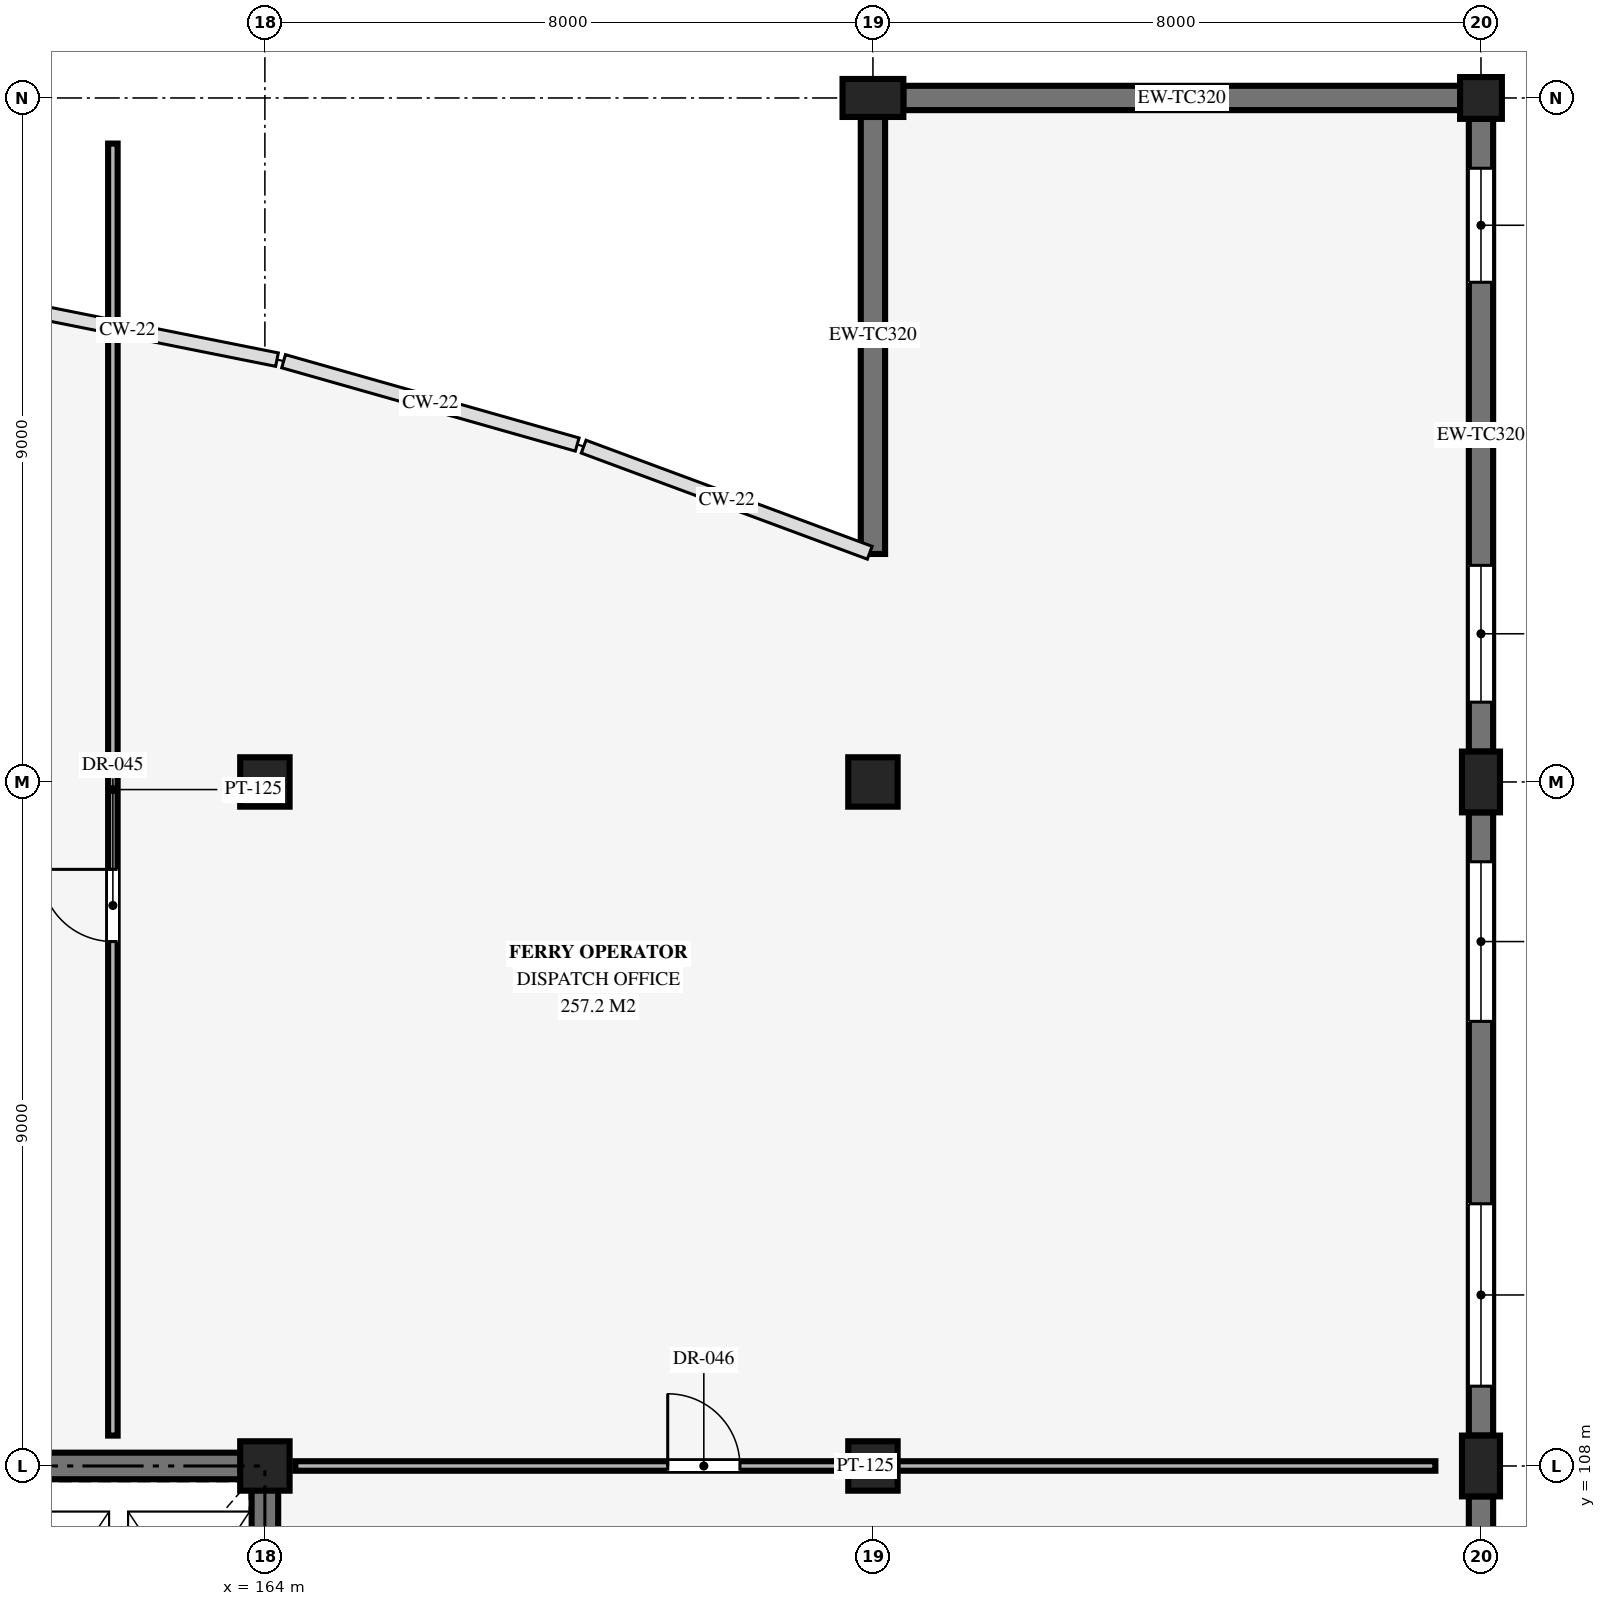
"""IFC4 building model, lengths in metres.
Left out: names, types, materials, properties, quantities, classifications, styles, units other than length and angle.
Written with IfcOpenShell. Run it as: python <this file> out.ifc"""

import sys

from ifc_helpers import new_model, si_unit, direction, frame, frame_2d, origin, origin_2d, place, context, subcontext, project, spatial, rectangle, extrude, element, fill, save


model = new_model("IFC4")
c1 = context("Model", 3, precision=1e-05, world=origin(), true_north=direction((0.0, 1.0)))
c2 = subcontext(c1, "Body", "Model", "MODEL_VIEW")
j1 = project(units=[si_unit("LENGTHUNIT", "METRE"), si_unit("PLANEANGLEUNIT", "RADIAN")], contexts=[c1])
p1 = place(None, origin())
s1 = spatial("IfcSite", under=j1, at=p1, CompositionType="ELEMENT")
p2 = place(p1, origin())
s2 = spatial("IfcBuilding", under=s1, at=p2, CompositionType="ELEMENT")
p3 = place(p2, frame((0.0, 0.0, 15.0)))
s3 = spatial("IfcBuildingStorey", under=s2, at=p3, CompositionType="ELEMENT", Elevation=15.0)
for number, where, z_axis, x_axis in (
    (1, (164.0, 108.0, 0.0), (0.0, 0.0, 1.0), (1.0, 0.0, 0.0)),
    (2, (164.0, 117.0, 0.0), (0.0, 0.0, 1.0), (1.0, 0.0, 0.0)),
    (3, (172.0, 108.0, 0.0), (0.0, 0.0, 1.0), (1.0, 0.0, 0.0)),
    (4, (172.0, 117.0, 0.0), (0.0, 0.0, 1.0), (1.0, 0.0, 0.0)),
):
    element("IfcColumn", number, at=place(p3, frame(where, z_axis=z_axis, x_axis=x_axis)), inside=s3, PredefinedType="COLUMN", context=c2, shape_type="SweptSolid", body=[
        extrude(rectangle(XDim=0.65, YDim=0.65, at=origin_2d()), origin(), (0.0, 0.0, 1.0), 4.34),
    ])
for number, where, z_axis, x_axis in (
    (5, (172.0, 126.0, 0.0), (0.0, 0.0, 1.0), (0.0, 1.0, 0.0)),
    (6, (180.0, 108.0, 0.0), (0.0, 0.0, 1.0), (1.0, 0.0, 0.0)),
    (7, (180.0, 117.0, 0.0), (0.0, 0.0, 1.0), (1.0, 0.0, 0.0)),
):
    element("IfcColumn", number, at=place(p3, frame(where, z_axis=z_axis, x_axis=x_axis)), inside=s3, PredefinedType="PILASTER", context=c2, shape_type="SweptSolid", body=[
        extrude(rectangle(XDim=0.5, YDim=0.8, at=origin_2d()), origin(), (0.0, 0.0, 1.0), 4.34),
    ])
p4 = place(p3, frame((180.0, 126.0, 0.0), z_axis=(0.0, 0.0, 1.0), x_axis=(1.0, 0.0, 0.0)))
e8 = element("IfcColumn", 8, at=p4, inside=s3, PredefinedType="COLUMN", context=c2, shape_type="SweptSolid", body=[
    extrude(rectangle(XDim=0.55, YDim=0.55, at=origin_2d()), origin(), (0.0, 0.0, 1.0), 4.34),
])
p5 = place(p3, frame((180.0, 99.4, 0.0), z_axis=(0.0, 0.0, 1.0), x_axis=(0.0, 1.0, 0.0)))
e9 = element("IfcWall", 9, at=p5, inside=s3, PredefinedType="SOLIDWALL", context=c2, shape_type="SweptSolid", body=[
    extrude(rectangle(XDim=8.2, YDim=0.32, at=frame_2d((4.1, 0.0))), origin(), (0.0, 0.0, 1.0), 4.24),
])
p6 = place(p5, frame((0.65, 0.0, 0.95)))
e10 = element("IfcOpeningElement", 10, at=p6, cuts=e9, PredefinedType="OPENING", context=c2, shape_type="SweptSolid", body=[
    extrude(rectangle(XDim=1.5, YDim=2.2, at=frame_2d((0.75, 1.1))), frame((0.0, 0.17, 0.0), z_axis=(0.0, -1.0, 0.0), x_axis=(1.0, 0.0, 0.0)), (0.0, 0.0, 1.0), 0.34),
])
p7 = place(p5, frame((6.35, 0.0, 0.95)))
e11 = element("IfcOpeningElement", 11, at=p7, cuts=e9, PredefinedType="OPENING", context=c2, shape_type="SweptSolid", body=[
    extrude(rectangle(XDim=1.2, YDim=2.2, at=frame_2d((0.6, 1.1))), frame((0.0, 0.17, 0.0), z_axis=(0.0, -1.0, 0.0), x_axis=(1.0, 0.0, 0.0)), (0.0, 0.0, 1.0), 0.34),
])
p8 = place(p3, frame((180.0, 108.4, 0.0), z_axis=(0.0, 0.0, 1.0), x_axis=(0.0, 1.0, 0.0)))
e12 = element("IfcWall", 12, at=p8, inside=s3, PredefinedType="SOLIDWALL", context=c2, shape_type="SweptSolid", body=[
    extrude(rectangle(XDim=8.2, YDim=0.32, at=frame_2d((4.1, 0.0))), origin(), (0.0, 0.0, 1.0), 4.24),
])
p9 = place(p8, frame((0.65, 0.0, 0.95)))
e13 = element("IfcOpeningElement", 13, at=p9, cuts=e12, PredefinedType="OPENING", context=c2, shape_type="SweptSolid", body=[
    extrude(rectangle(XDim=2.4, YDim=1.8, at=frame_2d((1.2, 0.9))), frame((0.0, 0.17, 0.0), z_axis=(0.0, -1.0, 0.0), x_axis=(1.0, 0.0, 0.0)), (0.0, 0.0, 1.0), 0.34),
])
p10 = place(p8, frame((5.45, 0.0, 0.95)))
e14 = element("IfcOpeningElement", 14, at=p10, cuts=e12, PredefinedType="OPENING", context=c2, shape_type="SweptSolid", body=[
    extrude(rectangle(XDim=2.1, YDim=1.8, at=frame_2d((1.05, 0.9))), frame((0.0, 0.17, 0.0), z_axis=(0.0, -1.0, 0.0), x_axis=(1.0, 0.0, 0.0)), (0.0, 0.0, 1.0), 0.34),
])
p11 = place(p3, frame((180.0, 117.4, 0.0), z_axis=(0.0, 0.0, 1.0), x_axis=(0.0, 1.0, 0.0)))
e15 = element("IfcWall", 15, at=p11, inside=s3, PredefinedType="SOLIDWALL", context=c2, shape_type="SweptSolid", body=[
    extrude(rectangle(XDim=8.325, YDim=0.32, at=frame_2d((4.163, 0.0))), origin(), (0.0, 0.0, 1.0), 4.24),
])
p12 = place(p11, frame((0.65, 0.0, 0.95)))
e16 = element("IfcOpeningElement", 16, at=p12, cuts=e15, PredefinedType="OPENING", context=c2, shape_type="SweptSolid", body=[
    extrude(rectangle(XDim=1.8, YDim=1.8, at=frame_2d((0.9, 0.9))), frame((0.0, 0.17, 0.0), z_axis=(0.0, -1.0, 0.0), x_axis=(1.0, 0.0, 0.0)), (0.0, 0.0, 1.0), 0.34),
])
p13 = place(p11, frame((6.175, 0.0, 0.95)))
e17 = element("IfcOpeningElement", 17, at=p13, cuts=e15, PredefinedType="OPENING", context=c2, shape_type="SweptSolid", body=[
    extrude(rectangle(XDim=1.5, YDim=1.8, at=frame_2d((0.75, 0.9))), frame((0.0, 0.17, 0.0), z_axis=(0.0, -1.0, 0.0), x_axis=(1.0, 0.0, 0.0)), (0.0, 0.0, 1.0), 0.34),
])
p14 = place(p3, frame((172.0, 120.0, 0.0), z_axis=(0.0, 0.0, 1.0), x_axis=(0.0, 1.0, 0.0)))
e18 = element("IfcWall", 18, at=p14, inside=s3, PredefinedType="SOLIDWALL", context=c2, shape_type="SweptSolid", body=[
    extrude(rectangle(XDim=5.75, YDim=0.32, at=frame_2d((2.875, 0.0))), origin(), (0.0, 0.0, 1.0), 4.24),
])
p15 = place(p3, frame((172.4, 126.0, 0.0), z_axis=(0.0, 0.0, 1.0), x_axis=(1.0, 0.0, 0.0)))
e19 = element("IfcWall", 19, at=p15, inside=s3, PredefinedType="SOLIDWALL", context=c2, shape_type="SweptSolid", body=[
    extrude(rectangle(XDim=7.325, YDim=0.32, at=frame_2d((3.663, 0.0))), origin(), (0.0, 0.0, 1.0), 4.24),
])
p16 = place(p3, frame((156.0, 108.0, 0.0), z_axis=(0.0, 0.0, 1.0), x_axis=(1.0, 0.0, 0.0)))
e20 = element("IfcWall", 20, at=p16, inside=s3, PredefinedType="SHEAR", context=c2, shape_type="SweptSolid", body=[
    extrude(rectangle(XDim=8.0, YDim=0.35, at=frame_2d((4.0, 0.0))), origin(), (0.0, 0.0, 1.0), 4.48),
])
p17 = place(p3, frame((164.0, 99.0, 0.0), z_axis=(0.0, 0.0, 1.0), x_axis=(0.0, 1.0, 0.0)))
e21 = element("IfcWall", 21, at=p17, inside=s3, PredefinedType="SHEAR", context=c2, shape_type="SweptSolid", body=[
    extrude(rectangle(XDim=9.0, YDim=0.35, at=frame_2d((4.5, 0.0))), origin(), (0.0, 0.0, 1.0), 4.48),
])
p18 = place(p17, frame((1.4, 0.0, 0.0)))
e22 = element("IfcOpeningElement", 22, at=p18, cuts=e21, PredefinedType="OPENING", context=c2, shape_type="SweptSolid", body=[
    extrude(rectangle(XDim=1.5, YDim=2.2, at=frame_2d((0.75, 1.1))), frame((0.0, 0.185, 0.0), z_axis=(0.0, -1.0, 0.0), x_axis=(1.0, 0.0, 0.0)), (0.0, 0.0, 1.0), 0.37),
])
p19 = place(p3, frame((162.0, 108.4, 0.0), z_axis=(0.0, 0.0, 1.0), x_axis=(0.0, 1.0, 0.0)))
e23 = element("IfcWall", 23, at=p19, inside=s3, PredefinedType="PARTITIONING", context=c2, shape_type="SweptSolid", body=[
    extrude(rectangle(XDim=17.0, YDim=0.125, at=frame_2d((8.5, 0.0))), origin(), (0.0, 0.0, 1.0), 3.45),
])
p20 = place(p19, frame((6.5, 0.0, 0.0)))
e24 = element("IfcOpeningElement", 24, at=p20, cuts=e23, PredefinedType="OPENING", context=c2, shape_type="SweptSolid", body=[
    extrude(rectangle(XDim=0.95, YDim=2.1, at=frame_2d((0.475, 1.05))), frame((0.0, 0.073, 0.0), z_axis=(0.0, -1.0, 0.0), x_axis=(1.0, 0.0, 0.0)), (0.0, 0.0, 1.0), 0.145),
])
p21 = place(p3, frame((164.4, 108.0, 0.0), z_axis=(0.0, 0.0, 1.0), x_axis=(1.0, 0.0, 0.0)))
e25 = element("IfcWall", 25, at=p21, inside=s3, PredefinedType="PARTITIONING", context=c2, shape_type="SweptSolid", body=[
    extrude(rectangle(XDim=15.0, YDim=0.125, at=frame_2d((7.5, 0.0))), origin(), (0.0, 0.0, 1.0), 3.45),
])
p22 = place(p21, frame((4.9, 0.0, 0.0)))
e26 = element("IfcOpeningElement", 26, at=p22, cuts=e25, PredefinedType="OPENING", context=c2, shape_type="SweptSolid", body=[
    extrude(rectangle(XDim=0.95, YDim=2.1, at=frame_2d((0.475, 1.05))), frame((0.0, 0.073, 0.0), z_axis=(0.0, -1.0, 0.0), x_axis=(1.0, 0.0, 0.0)), (0.0, 0.0, 1.0), 0.145),
])
p23 = place(p9, origin())
e27 = element("IfcWindow", 27, at=p23, inside=s3, PartitioningType="SINGLE_PANEL", PredefinedType="WINDOW", context=c2, shape_type="SweptSolid", body=[
    extrude(rectangle(XDim=2.4, YDim=1.8, at=frame_2d((1.2, 0.9))), frame((0.0, 0.03, 0.0), z_axis=(0.0, -1.0, 0.0), x_axis=(1.0, 0.0, 0.0)), (0.0, 0.0, 1.0), 0.06),
])
fill(e13, e27)
p24 = place(p10, origin())
e28 = element("IfcWindow", 28, at=p24, inside=s3, PartitioningType="SINGLE_PANEL", PredefinedType="WINDOW", context=c2, shape_type="SweptSolid", body=[
    extrude(rectangle(XDim=2.1, YDim=1.8, at=frame_2d((1.05, 0.9))), frame((0.0, 0.03, 0.0), z_axis=(0.0, -1.0, 0.0), x_axis=(1.0, 0.0, 0.0)), (0.0, 0.0, 1.0), 0.06),
])
fill(e14, e28)
p25 = place(p12, origin())
e29 = element("IfcWindow", 29, at=p25, inside=s3, PartitioningType="SINGLE_PANEL", PredefinedType="WINDOW", context=c2, shape_type="SweptSolid", body=[
    extrude(rectangle(XDim=1.8, YDim=1.8, at=frame_2d((0.9, 0.9))), frame((0.0, 0.03, 0.0), z_axis=(0.0, -1.0, 0.0), x_axis=(1.0, 0.0, 0.0)), (0.0, 0.0, 1.0), 0.06),
])
fill(e16, e29)
p26 = place(p13, origin())
e30 = element("IfcWindow", 30, at=p26, inside=s3, PartitioningType="SINGLE_PANEL", PredefinedType="WINDOW", context=c2, shape_type="SweptSolid", body=[
    extrude(rectangle(XDim=1.5, YDim=1.8, at=frame_2d((0.75, 0.9))), frame((0.0, 0.03, 0.0), z_axis=(0.0, -1.0, 0.0), x_axis=(1.0, 0.0, 0.0)), (0.0, 0.0, 1.0), 0.06),
])
fill(e17, e30)
p27 = place(p20, origin())
e31 = element("IfcDoor", 31, at=p27, inside=s3, OperationType="SINGLE_SWING_RIGHT", PredefinedType="DOOR", context=c2, shape_type="SweptSolid", body=[
    extrude(rectangle(XDim=0.95, YDim=2.1, at=frame_2d((0.475, 1.05))), frame((0.0, 0.025, 0.0), z_axis=(0.0, -1.0, 0.0), x_axis=(1.0, 0.0, 0.0)), (0.0, 0.0, 1.0), 0.05),
])
fill(e24, e31)
p28 = place(p22, origin())
e32 = element("IfcDoor", 32, at=p28, inside=s3, OperationType="SINGLE_SWING_LEFT", PredefinedType="DOOR", context=c2, shape_type="SweptSolid", body=[
    extrude(rectangle(XDim=0.95, YDim=2.1, at=frame_2d((0.475, 1.05))), frame((0.0, 0.025, 0.0), z_axis=(0.0, -1.0, 0.0), x_axis=(1.0, 0.0, 0.0)), (0.0, 0.0, 1.0), 0.05),
])
fill(e26, e32)
save(model, sys.argv[1])
